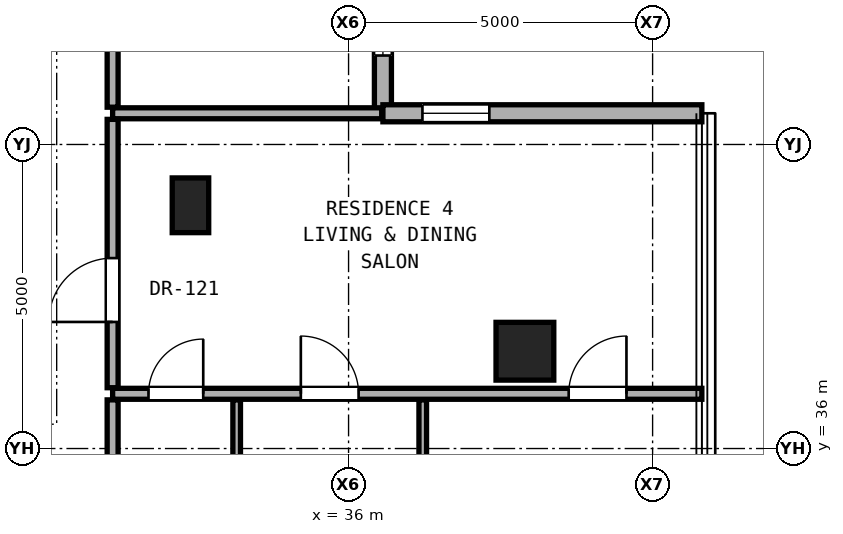
"""IFC4 building model, lengths in metres.
Left out: names, types, materials, properties, quantities, classifications, styles, units other than length and angle.
Written with IfcOpenShell. Run it as: python <this file> out.ifc"""

import sys

from ifc_helpers import new_model, si_unit, direction, frame, frame_2d, origin, origin_2d, place, context, subcontext, project, spatial, rectangle, hollow_rectangle, extrude, element, fill, save


model = new_model("IFC4")
c1 = context("Model", 3, precision=1e-05, world=origin(), true_north=direction((0.0, 1.0)))
c2 = subcontext(c1, "Body", "Model", "MODEL_VIEW")
j1 = project(units=[si_unit("LENGTHUNIT", "METRE"), si_unit("PLANEANGLEUNIT", "RADIAN")], contexts=[c1])
p1 = place(None, origin())
s1 = spatial("IfcSite", under=j1, at=p1, CompositionType="ELEMENT")
p2 = place(p1, origin())
s2 = spatial("IfcBuilding", under=s1, at=p2, CompositionType="ELEMENT")
p3 = place(p2, frame((0.0, 0.0, 173.9)))
s3 = spatial("IfcBuildingStorey", under=s2, at=p3, CompositionType="ELEMENT", Elevation=173.9)
p4 = place(p3, frame((38.9, 37.6, 0.0), z_axis=(0.0, 0.0, 1.0), x_axis=(1.0, 0.0, 0.0)))
e1 = element("IfcColumn", 1, at=p4, inside=s3, PredefinedType="COLUMN", context=c2, shape_type="SweptSolid", body=[
    extrude(hollow_rectangle(XDim=0.95, YDim=0.95, WallThickness=0.05, at=origin_2d()), origin(), (0.0, 0.0, 1.0), 3.25),
])
p5 = place(p3, frame((33.4, 40.0, 0.0), z_axis=(0.0, 0.0, 1.0), x_axis=(1.0, 0.0, 0.0)))
e2 = element("IfcColumn", 2, at=p5, inside=s3, PredefinedType="PILASTER", context=c2, shape_type="SweptSolid", body=[
    extrude(rectangle(XDim=0.6, YDim=0.9, at=origin_2d()), origin(), (0.0, 0.0, 1.0), 3.25),
])
p6 = place(p3, frame((36.565, 41.513, 0.0), z_axis=(0.0, 0.0, 1.0), x_axis=(0.0, 1.0, 0.0)))
e3 = element("IfcWall", 3, at=p6, inside=s3, PredefinedType="SOLIDWALL", context=c2, shape_type="SweptSolid", body=[
    extrude(rectangle(XDim=5.245, YDim=0.28, at=frame_2d((2.623, 0.0))), origin(), (0.0, 0.0, 1.0), 3.03),
])
p7 = place(p6, frame((0.95, 0.0, 0.85)))
e4 = element("IfcOpeningElement", 4, at=p7, cuts=e3, PredefinedType="OPENING", context=c2, shape_type="SweptSolid", body=[
    extrude(rectangle(XDim=1.1, YDim=2.0, at=frame_2d((0.55, 1.0))), frame((0.0, 0.15, 0.0), z_axis=(0.0, -1.0, 0.0), x_axis=(1.0, 0.0, 0.0)), (0.0, 0.0, 1.0), 0.3),
])
p8 = place(p3, frame((41.81, 41.513, 0.0), z_axis=(0.0, 0.0, 1.0), x_axis=(-1.0, 0.0, 0.0)))
e5 = element("IfcWall", 5, at=p8, inside=s3, PredefinedType="SOLIDWALL", context=c2, shape_type="SweptSolid", body=[
    extrude(rectangle(XDim=5.245, YDim=0.28, at=frame_2d((2.623, 0.0))), origin(), (0.0, 0.0, 1.0), 3.03),
])
p9 = place(p8, frame((3.495, 0.0, 0.85)))
e6 = element("IfcOpeningElement", 6, at=p9, cuts=e5, PredefinedType="OPENING", context=c2, shape_type="SweptSolid", body=[
    extrude(rectangle(XDim=1.1, YDim=2.0, at=frame_2d((0.55, 1.0))), frame((0.0, 0.15, 0.0), z_axis=(0.0, -1.0, 0.0), x_axis=(1.0, 0.0, 0.0)), (0.0, 0.0, 1.0), 0.3),
])
p10 = place(p3, frame((32.12, 36.9, 0.0), z_axis=(0.0, 0.0, 1.0), x_axis=(1.0, 0.0, 0.0)))
e7 = element("IfcWall", 7, at=p10, inside=s3, PredefinedType="PARTITIONING", context=c2, shape_type="SweptSolid", body=[
    extrude(rectangle(XDim=9.69, YDim=0.18, at=frame_2d((4.845, 0.0))), origin(), (0.0, 0.0, 1.0), 2.269),
])
p11 = place(p10, frame((7.5, 0.0, 0.0)))
e8 = element("IfcOpeningElement", 8, at=p11, cuts=e7, PredefinedType="OPENING", context=c2, shape_type="SweptSolid", body=[
    extrude(rectangle(XDim=0.95, YDim=2.15, at=frame_2d((0.475, 1.075))), frame((0.0, 0.1, 0.0), z_axis=(0.0, -1.0, 0.0), x_axis=(1.0, 0.0, 0.0)), (0.0, 0.0, 1.0), 0.2),
])
p12 = place(p10, frame((3.095, 0.0, 0.0)))
e9 = element("IfcOpeningElement", 9, at=p12, cuts=e7, PredefinedType="OPENING", context=c2, shape_type="SweptSolid", body=[
    extrude(rectangle(XDim=0.95, YDim=2.15, at=frame_2d((0.475, 1.075))), frame((0.0, 0.1, 0.0), z_axis=(0.0, -1.0, 0.0), x_axis=(1.0, 0.0, 0.0)), (0.0, 0.0, 1.0), 0.2),
])
p13 = place(p10, frame((0.59, 0.0, 0.0)))
e10 = element("IfcOpeningElement", 10, at=p13, cuts=e7, PredefinedType="OPENING", context=c2, shape_type="SweptSolid", body=[
    extrude(rectangle(XDim=0.9, YDim=2.1, at=frame_2d((0.45, 1.05))), frame((0.0, 0.1, 0.0), z_axis=(0.0, -1.0, 0.0), x_axis=(1.0, 0.0, 0.0)), (0.0, 0.0, 1.0), 0.2),
])
p14 = place(p3, frame((32.12, 41.513, 0.0), z_axis=(0.0, 0.0, 1.0), x_axis=(1.0, 0.0, 0.0)))
e11 = element("IfcWall", 11, at=p14, inside=s3, PredefinedType="PARTITIONING", context=c2, shape_type="SweptSolid", body=[
    extrude(rectangle(XDim=4.425, YDim=0.18, at=frame_2d((2.212, 0.0))), origin(), (0.0, 0.0, 1.0), 3.05),
])
p15 = place(p3, frame((32.12, 34.28, 0.0), z_axis=(0.0, 0.0, 1.0), x_axis=(0.0, 1.0, 0.0)))
e12 = element("IfcWall", 12, at=p15, inside=s3, PredefinedType="PARTITIONING", context=c2, shape_type="SweptSolid", body=[
    extrude(rectangle(XDim=2.52, YDim=0.18, at=frame_2d((1.26, 0.0))), origin(), (0.0, 0.0, 1.0), 3.05),
])
p16 = place(p3, frame((32.12, 37.0, 0.0), z_axis=(0.0, 0.0, 1.0), x_axis=(0.0, 1.0, 0.0)))
e13 = element("IfcWall", 13, at=p16, inside=s3, PredefinedType="PARTITIONING", context=c2, shape_type="SweptSolid", body=[
    extrude(rectangle(XDim=4.413, YDim=0.18, at=frame_2d((2.207, 0.0))), origin(), (0.0, 0.0, 1.0), 2.442),
])
p17 = place(p16, frame((1.082, 0.0, 0.0)))
e14 = element("IfcOpeningElement", 14, at=p17, cuts=e13, PredefinedType="OPENING", context=c2, shape_type="SweptSolid", body=[
    extrude(rectangle(XDim=1.05, YDim=2.2, at=frame_2d((0.525, 1.1))), frame((0.0, 0.1, 0.0), z_axis=(0.0, -1.0, 0.0), x_axis=(1.0, 0.0, 0.0)), (0.0, 0.0, 1.0), 0.2),
])
p18 = place(p3, frame((32.12, 41.613, 0.0), z_axis=(0.0, 0.0, 1.0), x_axis=(0.0, 1.0, 0.0)))
e15 = element("IfcWall", 15, at=p18, inside=s3, PredefinedType="PARTITIONING", context=c2, shape_type="SweptSolid", body=[
    extrude(rectangle(XDim=5.145, YDim=0.18, at=frame_2d((2.573, 0.0))), origin(), (0.0, 0.0, 1.0), 3.05),
])
p19 = place(p18, frame((2.097, 0.0, 0.0)))
e16 = element("IfcOpeningElement", 16, at=p19, cuts=e15, PredefinedType="OPENING", context=c2, shape_type="SweptSolid", body=[
    extrude(rectangle(XDim=0.95, YDim=2.15, at=frame_2d((0.475, 1.075))), frame((0.0, 0.1, 0.0), z_axis=(0.0, -1.0, 0.0), x_axis=(1.0, 0.0, 0.0)), (0.0, 0.0, 1.0), 0.2),
])
for number, where, z_axis, x_axis in (
    (17, (34.16, 34.28, 0.0), (0.0, 0.0, 1.0), (0.0, 1.0, 0.0)),
    (18, (37.22, 34.28, 0.0), (0.0, 0.0, 1.0), (0.0, 1.0, 0.0)),
):
    element("IfcWall", number, at=place(p3, frame(where, z_axis=z_axis, x_axis=x_axis)), inside=s3, PredefinedType="PARTITIONING", context=c2, shape_type="SweptSolid", body=[
        extrude(rectangle(XDim=2.52, YDim=0.125, at=frame_2d((1.26, 0.0))), origin(), (0.0, 0.0, 1.0), 3.05),
    ])
p20 = place(p7, origin())
e19 = element("IfcWindow", 19, at=p20, inside=s3, PartitioningType="SINGLE_PANEL", PredefinedType="WINDOW", context=c2, shape_type="SweptSolid", body=[
    extrude(rectangle(XDim=1.1, YDim=2.0, at=frame_2d((0.55, 1.0))), frame((0.0, 0.03, 0.0), z_axis=(0.0, -1.0, 0.0), x_axis=(1.0, 0.0, 0.0)), (0.0, 0.0, 1.0), 0.06),
])
fill(e4, e19)
p21 = place(p9, origin())
e20 = element("IfcWindow", 20, at=p21, inside=s3, PartitioningType="SINGLE_PANEL", PredefinedType="WINDOW", context=c2, shape_type="SweptSolid", body=[
    extrude(rectangle(XDim=1.1, YDim=2.0, at=frame_2d((0.55, 1.0))), frame((0.0, 0.03, 0.0), z_axis=(0.0, -1.0, 0.0), x_axis=(1.0, 0.0, 0.0)), (0.0, 0.0, 1.0), 0.06),
])
fill(e6, e20)
p22 = place(p17, origin())
e21 = element("IfcDoor", 21, at=p22, inside=s3, OperationType="SINGLE_SWING_LEFT", PredefinedType="DOOR", context=c2, shape_type="SweptSolid", body=[
    extrude(rectangle(XDim=1.05, YDim=2.2, at=frame_2d((0.525, 1.1))), frame((0.0, 0.025, 0.0), z_axis=(0.0, -1.0, 0.0), x_axis=(1.0, 0.0, 0.0)), (0.0, 0.0, 1.0), 0.05),
])
fill(e14, e21)
p23 = place(p11, origin())
e22 = element("IfcDoor", 22, at=p23, inside=s3, OperationType="SINGLE_SWING_RIGHT", PredefinedType="DOOR", context=c2, shape_type="SweptSolid", body=[
    extrude(rectangle(XDim=0.95, YDim=2.15, at=frame_2d((0.475, 1.075))), frame((0.0, 0.025, 0.0), z_axis=(0.0, -1.0, 0.0), x_axis=(1.0, 0.0, 0.0)), (0.0, 0.0, 1.0), 0.05),
])
fill(e8, e22)
p24 = place(p12, origin())
e23 = element("IfcDoor", 23, at=p24, inside=s3, OperationType="SINGLE_SWING_LEFT", PredefinedType="DOOR", context=c2, shape_type="SweptSolid", body=[
    extrude(rectangle(XDim=0.95, YDim=2.15, at=frame_2d((0.475, 1.075))), frame((0.0, 0.025, 0.0), z_axis=(0.0, -1.0, 0.0), x_axis=(1.0, 0.0, 0.0)), (0.0, 0.0, 1.0), 0.05),
])
fill(e9, e23)
p25 = place(p13, origin())
e24 = element("IfcDoor", 24, at=p25, inside=s3, OperationType="SINGLE_SWING_RIGHT", PredefinedType="DOOR", context=c2, shape_type="SweptSolid", body=[
    extrude(rectangle(XDim=0.9, YDim=2.1, at=frame_2d((0.45, 1.05))), frame((0.0, 0.025, 0.0), z_axis=(0.0, -1.0, 0.0), x_axis=(1.0, 0.0, 0.0)), (0.0, 0.0, 1.0), 0.05),
])
fill(e10, e24)
save(model, sys.argv[1])
